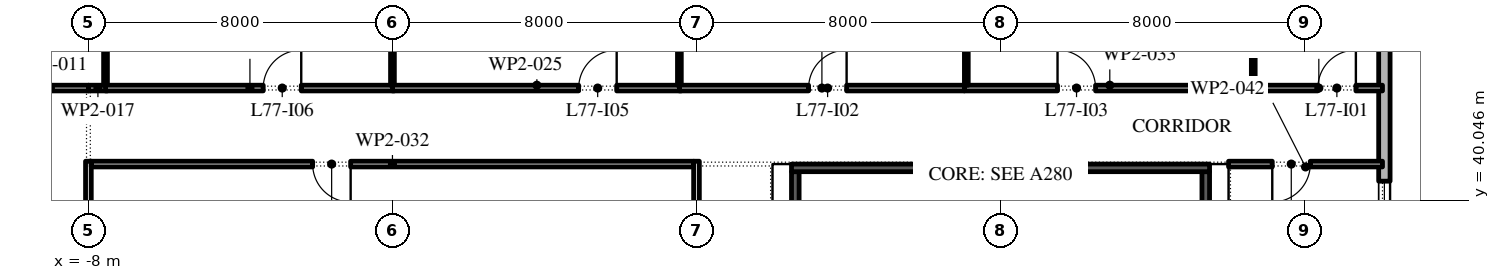
"""IFC4 building model, lengths in metres.
Left out: names, types, materials, properties, quantities, classifications, styles, units other than length and angle.
Written with IfcOpenShell. Run it as: python <this file> out.ifc"""

import sys

from ifc_helpers import new_model, si_unit, direction, frame, frame_2d, origin, place, context, subcontext, project, spatial, rectangle, extrude, element, fill, save


model = new_model("IFC4")
c1 = context("Model", 3, precision=1e-05, world=origin(), true_north=direction((0.0, 1.0)))
c2 = subcontext(c1, "Body", "Model", "MODEL_VIEW")
j1 = project(units=[si_unit("LENGTHUNIT", "METRE"), si_unit("PLANEANGLEUNIT", "RADIAN")], contexts=[c1])
p1 = place(None, origin())
s1 = spatial("IfcSite", under=j1, at=p1, CompositionType="ELEMENT")
p2 = place(p1, origin())
s2 = spatial("IfcBuilding", under=s1, at=p2, CompositionType="ELEMENT")
p3 = place(p2, frame((0.0, 0.0, 351.0)))
s3 = spatial("IfcBuildingStorey", under=s2, at=p3, CompositionType="ELEMENT", Elevation=351.0)
p4 = place(p3, frame((26.1, -2.1, 0.0), z_axis=(0.0, 0.0, 1.0), x_axis=(0.0, 1.0, 0.0)))
e1 = element("IfcWall", 1, at=p4, inside=s3, PredefinedType="STANDARD", context=c2, shape_type="SweptSolid", body=[
    extrude(rectangle(XDim=51.5, YDim=0.3, at=frame_2d((25.75, 0.0))), origin(), (0.0, 0.0, 1.0), 4.0),
])
p5 = place(p4, frame((1.3, 0.0, 0.45)))
e2 = element("IfcOpeningElement", 2, at=p5, cuts=e1, PredefinedType="OPENING", context=c2, shape_type="SweptSolid", body=[
    extrude(rectangle(XDim=4.5, YDim=3.05, at=frame_2d((2.25, 1.525))), frame((0.0, 0.16, 0.0), z_axis=(0.0, -1.0, 0.0), x_axis=(1.0, 0.0, 0.0)), (0.0, 0.0, 1.0), 0.32),
])
p6 = place(p4, frame((8.55, 0.0, 0.45)))
e3 = element("IfcOpeningElement", 3, at=p6, cuts=e1, PredefinedType="OPENING", context=c2, shape_type="SweptSolid", body=[
    extrude(rectangle(XDim=4.5, YDim=3.05, at=frame_2d((2.25, 1.525))), frame((0.0, 0.16, 0.0), z_axis=(0.0, -1.0, 0.0), x_axis=(1.0, 0.0, 0.0)), (0.0, 0.0, 1.0), 0.32),
])
p7 = place(p4, frame((17.0, 0.0, 0.0)))
e4 = element("IfcOpeningElement", 4, at=p7, cuts=e1, PredefinedType="OPENING", context=c2, shape_type="SweptSolid", body=[
    extrude(rectangle(XDim=2.4, YDim=3.5, at=frame_2d((1.2, 1.75))), frame((0.0, 0.16, 0.0), z_axis=(0.0, -1.0, 0.0), x_axis=(1.0, 0.0, 0.0)), (0.0, 0.0, 1.0), 0.32),
])
p8 = place(p4, frame((23.35, 0.0, 0.45)))
e5 = element("IfcOpeningElement", 5, at=p8, cuts=e1, PredefinedType="OPENING", context=c2, shape_type="SweptSolid", body=[
    extrude(rectangle(XDim=4.5, YDim=3.05, at=frame_2d((2.25, 1.525))), frame((0.0, 0.16, 0.0), z_axis=(0.0, -1.0, 0.0), x_axis=(1.0, 0.0, 0.0)), (0.0, 0.0, 1.0), 0.32),
])
p9 = place(p4, frame((30.75, 0.0, 0.45)))
e6 = element("IfcOpeningElement", 6, at=p9, cuts=e1, PredefinedType="OPENING", context=c2, shape_type="SweptSolid", body=[
    extrude(rectangle(XDim=4.5, YDim=3.05, at=frame_2d((2.25, 1.525))), frame((0.0, 0.16, 0.0), z_axis=(0.0, -1.0, 0.0), x_axis=(1.0, 0.0, 0.0)), (0.0, 0.0, 1.0), 0.32),
])
p10 = place(p4, frame((38.15, 0.0, 0.45)))
e7 = element("IfcOpeningElement", 7, at=p10, cuts=e1, PredefinedType="OPENING", context=c2, shape_type="SweptSolid", body=[
    extrude(rectangle(XDim=4.5, YDim=3.05, at=frame_2d((2.25, 1.525))), frame((0.0, 0.16, 0.0), z_axis=(0.0, -1.0, 0.0), x_axis=(1.0, 0.0, 0.0)), (0.0, 0.0, 1.0), 0.32),
])
p11 = place(p4, frame((46.6, 0.0, 0.0)))
e8 = element("IfcOpeningElement", 8, at=p11, cuts=e1, PredefinedType="OPENING", context=c2, shape_type="SweptSolid", body=[
    extrude(rectangle(XDim=2.4, YDim=3.5, at=frame_2d((1.2, 1.75))), frame((0.0, 0.16, 0.0), z_axis=(0.0, -1.0, 0.0), x_axis=(1.0, 0.0, 0.0)), (0.0, 0.0, 1.0), 0.32),
])
p12 = place(p3, frame((21.4, 25.75, 0.0), z_axis=(0.0, 0.0, 1.0), x_axis=(0.0, 1.0, 0.0)))
e9 = element("IfcWall", 9, at=p12, inside=s3, PredefinedType="SHEAR", context=c2, shape_type="SweptSolid", body=[
    extrude(rectangle(XDim=15.05, YDim=0.2, at=frame_2d((7.525, 0.0))), origin(), (0.0, 0.0, 1.0), 4.0),
])
p13 = place(p3, frame((10.6, 25.75, 0.0), z_axis=(0.0, 0.0, 1.0), x_axis=(0.0, 1.0, 0.0)))
e10 = element("IfcWall", 10, at=p13, inside=s3, PredefinedType="SHEAR", context=c2, shape_type="SweptSolid", body=[
    extrude(rectangle(XDim=15.05, YDim=0.2, at=frame_2d((7.525, 0.0))), origin(), (0.0, 0.0, 1.0), 4.0),
])
p14 = place(p13, frame((7.075, 0.0, 0.0)))
e11 = element("IfcOpeningElement", 11, at=p14, cuts=e10, PredefinedType="OPENING", context=c2, shape_type="SweptSolid", body=[
    extrude(rectangle(XDim=0.9, YDim=2.1, at=frame_2d((0.45, 1.05))), frame((0.0, 0.11, 0.0), z_axis=(0.0, -1.0, 0.0), x_axis=(1.0, 0.0, 0.0)), (0.0, 0.0, 1.0), 0.22),
])
p15 = place(p3, frame((10.5, 40.9, 0.0), z_axis=(0.0, 0.0, 1.0), x_axis=(1.0, 0.0, 0.0)))
e12 = element("IfcWall", 12, at=p15, inside=s3, PredefinedType="SHEAR", context=c2, shape_type="SweptSolid", body=[
    extrude(rectangle(XDim=11.0, YDim=0.2, at=frame_2d((5.5, 0.0))), origin(), (0.0, 0.0, 1.0), 4.0),
])
p16 = place(p3, frame((-10.0, 43.0, 0.0), z_axis=(0.0, 0.0, 1.0), x_axis=(1.0, 0.0, 0.0)))
e13 = element("IfcWall", 13, at=p16, inside=s3, PredefinedType="PARTITIONING", context=c2, shape_type="SweptSolid", body=[
    extrude(rectangle(XDim=2.0, YDim=0.15, at=frame_2d((1.0, 0.0))), origin(), (0.0, 0.0, 1.0), 4.0),
])
p17 = place(p3, frame((-8.0, 41.075, 0.0), z_axis=(0.0, 0.0, 1.0), x_axis=(0.0, -1.0, 0.0)))
e14 = element("IfcWall", 14, at=p17, inside=s3, PredefinedType="PARTITIONING", context=c2, shape_type="SweptSolid", body=[
    extrude(rectangle(XDim=6.475, YDim=0.15, at=frame_2d((3.237, 0.0))), origin(), (0.0, 0.0, 1.0), 4.0),
])
p18 = place(p3, frame((-8.0, 43.0, 0.0), z_axis=(0.0, 0.0, 1.0), x_axis=(1.0, 0.0, 0.0)))
e15 = element("IfcWall", 15, at=p18, inside=s3, PredefinedType="PARTITIONING", context=c2, shape_type="SweptSolid", body=[
    extrude(rectangle(XDim=0.5, YDim=0.15, at=frame_2d((0.25, 0.0))), origin(), (0.0, 0.0, 1.0), 4.0),
])
p19 = place(p3, frame((-7.55, 43.075, 0.0), z_axis=(0.0, 0.0, 1.0), x_axis=(0.0, 1.0, 0.0)))
e16 = element("IfcWall", 16, at=p19, inside=s3, PredefinedType="PARTITIONING", context=c2, shape_type="SweptSolid", body=[
    extrude(rectangle(XDim=3.875, YDim=0.1, at=frame_2d((1.938, 0.0))), origin(), (0.0, 0.0, 1.0), 3.096),
])
p20 = place(p3, frame((-7.55, 43.0, 0.0), z_axis=(0.0, 0.0, 1.0), x_axis=(1.0, 0.0, 0.0)))
e17 = element("IfcWall", 17, at=p20, inside=s3, PredefinedType="PARTITIONING", context=c2, shape_type="SweptSolid", body=[
    extrude(rectangle(XDim=7.6, YDim=0.15, at=frame_2d((3.8, 0.0))), origin(), (0.0, 0.0, 1.0), 4.0),
])
p21 = place(p20, frame((4.15, 0.0, 0.0)))
e18 = element("IfcOpeningElement", 18, at=p21, cuts=e17, PredefinedType="OPENING", context=c2, shape_type="SweptSolid", body=[
    extrude(rectangle(XDim=1.0, YDim=2.1, at=frame_2d((0.5, 1.05))), frame((0.0, 0.085, 0.0), z_axis=(0.0, -1.0, 0.0), x_axis=(1.0, 0.0, 0.0)), (0.0, 0.0, 1.0), 0.17),
])
p22 = place(p3, frame((0.0, 43.075, 0.0), z_axis=(0.0, 0.0, 1.0), x_axis=(0.0, 1.0, 0.0)))
e19 = element("IfcWall", 19, at=p22, inside=s3, PredefinedType="PARTITIONING", context=c2, shape_type="SweptSolid", body=[
    extrude(rectangle(XDim=9.725, YDim=0.1, at=frame_2d((4.863, 0.0))), origin(), (0.0, 0.0, 1.0), 4.0),
])
p23 = place(p3, frame((0.0, 43.0, 0.0), z_axis=(0.0, 0.0, 1.0), x_axis=(1.0, 0.0, 0.0)))
e20 = element("IfcWall", 20, at=p23, inside=s3, PredefinedType="PARTITIONING", context=c2, shape_type="SweptSolid", body=[
    extrude(rectangle(XDim=7.6, YDim=0.15, at=frame_2d((3.8, 0.0))), origin(), (0.0, 0.0, 1.0), 4.0),
])
p24 = place(p23, frame((4.9, 0.0, 0.0)))
e21 = element("IfcOpeningElement", 21, at=p24, cuts=e20, PredefinedType="OPENING", context=c2, shape_type="SweptSolid", body=[
    extrude(rectangle(XDim=1.0, YDim=2.1, at=frame_2d((0.5, 1.05))), frame((0.0, 0.085, 0.0), z_axis=(0.0, -1.0, 0.0), x_axis=(1.0, 0.0, 0.0)), (0.0, 0.0, 1.0), 0.17),
])
p25 = place(p3, frame((7.55, 43.075, 0.0), z_axis=(0.0, 0.0, 1.0), x_axis=(0.0, 1.0, 0.0)))
e22 = element("IfcWall", 22, at=p25, inside=s3, PredefinedType="PARTITIONING", context=c2, shape_type="SweptSolid", body=[
    extrude(rectangle(XDim=9.725, YDim=0.1, at=frame_2d((4.863, 0.0))), origin(), (0.0, 0.0, 1.0), 3.096),
])
p26 = place(p3, frame((7.55, 43.0, 0.0), z_axis=(0.0, 0.0, 1.0), x_axis=(1.0, 0.0, 0.0)))
e23 = element("IfcWall", 23, at=p26, inside=s3, PredefinedType="PARTITIONING", context=c2, shape_type="SweptSolid", body=[
    extrude(rectangle(XDim=7.5, YDim=0.15, at=frame_2d((3.75, 0.0))), origin(), (0.0, 0.0, 1.0), 4.0),
])
p27 = place(p26, frame((3.4, 0.0, 0.0)))
e24 = element("IfcOpeningElement", 24, at=p27, cuts=e23, PredefinedType="OPENING", context=c2, shape_type="SweptSolid", body=[
    extrude(rectangle(XDim=1.0, YDim=2.1, at=frame_2d((0.5, 1.05))), frame((0.0, 0.085, 0.0), z_axis=(0.0, -1.0, 0.0), x_axis=(1.0, 0.0, 0.0)), (0.0, 0.0, 1.0), 0.17),
])
p28 = place(p3, frame((8.0, 34.65, 0.0), z_axis=(0.0, 0.0, 1.0), x_axis=(0.0, 1.0, 0.0)))
e25 = element("IfcWall", 25, at=p28, inside=s3, PredefinedType="PARTITIONING", context=c2, shape_type="SweptSolid", body=[
    extrude(rectangle(XDim=6.425, YDim=0.15, at=frame_2d((3.212, 0.0))), origin(), (0.0, 0.0, 1.0), 4.0),
])
p29 = place(p3, frame((7.925, 41.0, 0.0), z_axis=(0.0, 0.0, 1.0), x_axis=(-1.0, 0.0, 0.0)))
e26 = element("IfcWall", 26, at=p29, inside=s3, PredefinedType="PARTITIONING", context=c2, shape_type="SweptSolid", body=[
    extrude(rectangle(XDim=15.85, YDim=0.15, at=frame_2d((7.925, 0.0))), origin(), (0.0, 0.0, 1.0), 4.0),
])
p30 = place(p29, frame((9.025, 0.0, 0.0)))
e27 = element("IfcOpeningElement", 27, at=p30, cuts=e26, PredefinedType="OPENING", context=c2, shape_type="SweptSolid", body=[
    extrude(rectangle(XDim=1.0, YDim=2.1, at=frame_2d((0.5, 1.05))), frame((0.0, 0.085, 0.0), z_axis=(0.0, -1.0, 0.0), x_axis=(1.0, 0.0, 0.0)), (0.0, 0.0, 1.0), 0.17),
])
p31 = place(p3, frame((15.05, 43.0, 0.0), z_axis=(0.0, 0.0, 1.0), x_axis=(1.0, 0.0, 0.0)))
e28 = element("IfcWall", 28, at=p31, inside=s3, PredefinedType="PARTITIONING", context=c2, shape_type="SweptSolid", body=[
    extrude(rectangle(XDim=7.65, YDim=0.15, at=frame_2d((3.825, 0.0))), origin(), (0.0, 0.0, 1.0), 4.0),
])
p32 = place(p31, frame((2.45, 0.0, 0.0)))
e29 = element("IfcOpeningElement", 29, at=p32, cuts=e28, PredefinedType="OPENING", context=c2, shape_type="SweptSolid", body=[
    extrude(rectangle(XDim=1.0, YDim=2.1, at=frame_2d((0.5, 1.05))), frame((0.0, 0.085, 0.0), z_axis=(0.0, -1.0, 0.0), x_axis=(1.0, 0.0, 0.0)), (0.0, 0.0, 1.0), 0.17),
])
p33 = place(p3, frame((15.1, 47.05, 0.0), z_axis=(0.0, 0.0, 1.0), x_axis=(0.0, -1.0, 0.0)))
e30 = element("IfcWall", 30, at=p33, inside=s3, PredefinedType="PARTITIONING", context=c2, shape_type="SweptSolid", body=[
    extrude(rectangle(XDim=3.975, YDim=0.1, at=frame_2d((1.988, 0.0))), origin(), (0.0, 0.0, 1.0), 4.0),
])
p34 = place(p3, frame((22.65, 43.075, 0.0), z_axis=(0.0, 0.0, 1.0), x_axis=(0.0, 1.0, 0.0)))
e31 = element("IfcWall", 31, at=p34, inside=s3, PredefinedType="PARTITIONING", context=c2, shape_type="SweptSolid", body=[
    extrude(rectangle(XDim=3.875, YDim=0.1, at=frame_2d((1.938, 0.0))), origin(), (0.0, 0.0, 1.0), 4.0),
])
p35 = place(p3, frame((22.7, 43.0, 0.0), z_axis=(0.0, 0.0, 1.0), x_axis=(1.0, 0.0, 0.0)))
e32 = element("IfcWall", 32, at=p35, inside=s3, PredefinedType="PARTITIONING", context=c2, shape_type="SweptSolid", body=[
    extrude(rectangle(XDim=3.35, YDim=0.15, at=frame_2d((1.675, 0.0))), origin(), (0.0, 0.0, 1.0), 4.0),
])
p36 = place(p35, frame((1.65, 0.0, 0.0)))
e33 = element("IfcOpeningElement", 33, at=p36, cuts=e32, PredefinedType="OPENING", context=c2, shape_type="SweptSolid", body=[
    extrude(rectangle(XDim=1.0, YDim=2.1, at=frame_2d((0.5, 1.05))), frame((0.0, 0.085, 0.0), z_axis=(0.0, -1.0, 0.0), x_axis=(1.0, 0.0, 0.0)), (0.0, 0.0, 1.0), 0.17),
])
p37 = place(p3, frame((26.05, 41.0, 0.0), z_axis=(0.0, 0.0, 1.0), x_axis=(-1.0, 0.0, 0.0)))
e34 = element("IfcWall", 34, at=p37, inside=s3, PredefinedType="PARTITIONING", context=c2, shape_type="SweptSolid", body=[
    extrude(rectangle(XDim=4.05, YDim=0.15, at=frame_2d((2.025, 0.0))), origin(), (0.0, 0.0, 1.0), 4.0),
])
p38 = place(p37, frame((1.9, 0.0, 0.0)))
e35 = element("IfcOpeningElement", 35, at=p38, cuts=e34, PredefinedType="OPENING", context=c2, shape_type="SweptSolid", body=[
    extrude(rectangle(XDim=1.0, YDim=2.1, at=frame_2d((0.5, 1.05))), frame((0.0, 0.085, 0.0), z_axis=(0.0, -1.0, 0.0), x_axis=(1.0, 0.0, 0.0)), (0.0, 0.0, 1.0), 0.17),
])
p39 = place(p10, origin())
e36 = element("IfcWindow", 36, at=p39, inside=s3, PartitioningType="DOUBLE_PANEL_VERTICAL", PredefinedType="WINDOW", context=c2, shape_type="SweptSolid", body=[
    extrude(rectangle(XDim=4.5, YDim=3.05, at=frame_2d((2.25, 1.525))), frame((0.0, 0.03, 0.0), z_axis=(0.0, -1.0, 0.0), x_axis=(1.0, 0.0, 0.0)), (0.0, 0.0, 1.0), 0.06),
])
fill(e7, e36)
p40 = place(p36, origin())
e37 = element("IfcDoor", 37, at=p40, inside=s3, OperationType="SINGLE_SWING_LEFT", PredefinedType="DOOR", context=c2, shape_type="SweptSolid", body=[
    extrude(rectangle(XDim=1.0, YDim=2.1, at=frame_2d((0.5, 1.05))), frame((0.0, 0.025, 0.0), z_axis=(0.0, -1.0, 0.0), x_axis=(1.0, 0.0, 0.0)), (0.0, 0.0, 1.0), 0.05),
])
fill(e33, e37)
p41 = place(p27, origin())
e38 = element("IfcDoor", 38, at=p41, inside=s3, OperationType="SINGLE_SWING_LEFT", PredefinedType="DOOR", context=c2, shape_type="SweptSolid", body=[
    extrude(rectangle(XDim=1.0, YDim=2.1, at=frame_2d((0.5, 1.05))), frame((0.0, 0.025, 0.0), z_axis=(0.0, -1.0, 0.0), x_axis=(1.0, 0.0, 0.0)), (0.0, 0.0, 1.0), 0.05),
])
fill(e24, e38)
p42 = place(p32, origin())
e39 = element("IfcDoor", 39, at=p42, inside=s3, OperationType="SINGLE_SWING_RIGHT", PredefinedType="DOOR", context=c2, shape_type="SweptSolid", body=[
    extrude(rectangle(XDim=1.0, YDim=2.1, at=frame_2d((0.5, 1.05))), frame((0.0, 0.025, 0.0), z_axis=(0.0, -1.0, 0.0), x_axis=(1.0, 0.0, 0.0)), (0.0, 0.0, 1.0), 0.05),
])
fill(e29, e39)
p43 = place(p24, origin())
e40 = element("IfcDoor", 40, at=p43, inside=s3, OperationType="SINGLE_SWING_LEFT", PredefinedType="DOOR", context=c2, shape_type="SweptSolid", body=[
    extrude(rectangle(XDim=1.0, YDim=2.1, at=frame_2d((0.5, 1.05))), frame((0.0, 0.025, 0.0), z_axis=(0.0, -1.0, 0.0), x_axis=(1.0, 0.0, 0.0)), (0.0, 0.0, 1.0), 0.05),
])
fill(e21, e40)
p44 = place(p21, origin())
e41 = element("IfcDoor", 41, at=p44, inside=s3, OperationType="SINGLE_SWING_LEFT", PredefinedType="DOOR", context=c2, shape_type="SweptSolid", body=[
    extrude(rectangle(XDim=1.0, YDim=2.1, at=frame_2d((0.5, 1.05))), frame((0.0, 0.025, 0.0), z_axis=(0.0, -1.0, 0.0), x_axis=(1.0, 0.0, 0.0)), (0.0, 0.0, 1.0), 0.05),
])
fill(e18, e41)
p45 = place(p30, origin())
e42 = element("IfcDoor", 42, at=p45, inside=s3, OperationType="SINGLE_SWING_RIGHT", PredefinedType="DOOR", context=c2, shape_type="SweptSolid", body=[
    extrude(rectangle(XDim=1.0, YDim=2.1, at=frame_2d((0.5, 1.05))), frame((0.0, 0.025, 0.0), z_axis=(0.0, -1.0, 0.0), x_axis=(1.0, 0.0, 0.0)), (0.0, 0.0, 1.0), 0.05),
])
fill(e27, e42)
p46 = place(p38, origin())
e43 = element("IfcDoor", 43, at=p46, inside=s3, OperationType="SINGLE_SWING_LEFT", PredefinedType="DOOR", context=c2, shape_type="SweptSolid", body=[
    extrude(rectangle(XDim=1.0, YDim=2.1, at=frame_2d((0.5, 1.05))), frame((0.0, 0.025, 0.0), z_axis=(0.0, -1.0, 0.0), x_axis=(1.0, 0.0, 0.0)), (0.0, 0.0, 1.0), 0.05),
])
fill(e35, e43)
save(model, sys.argv[1])
